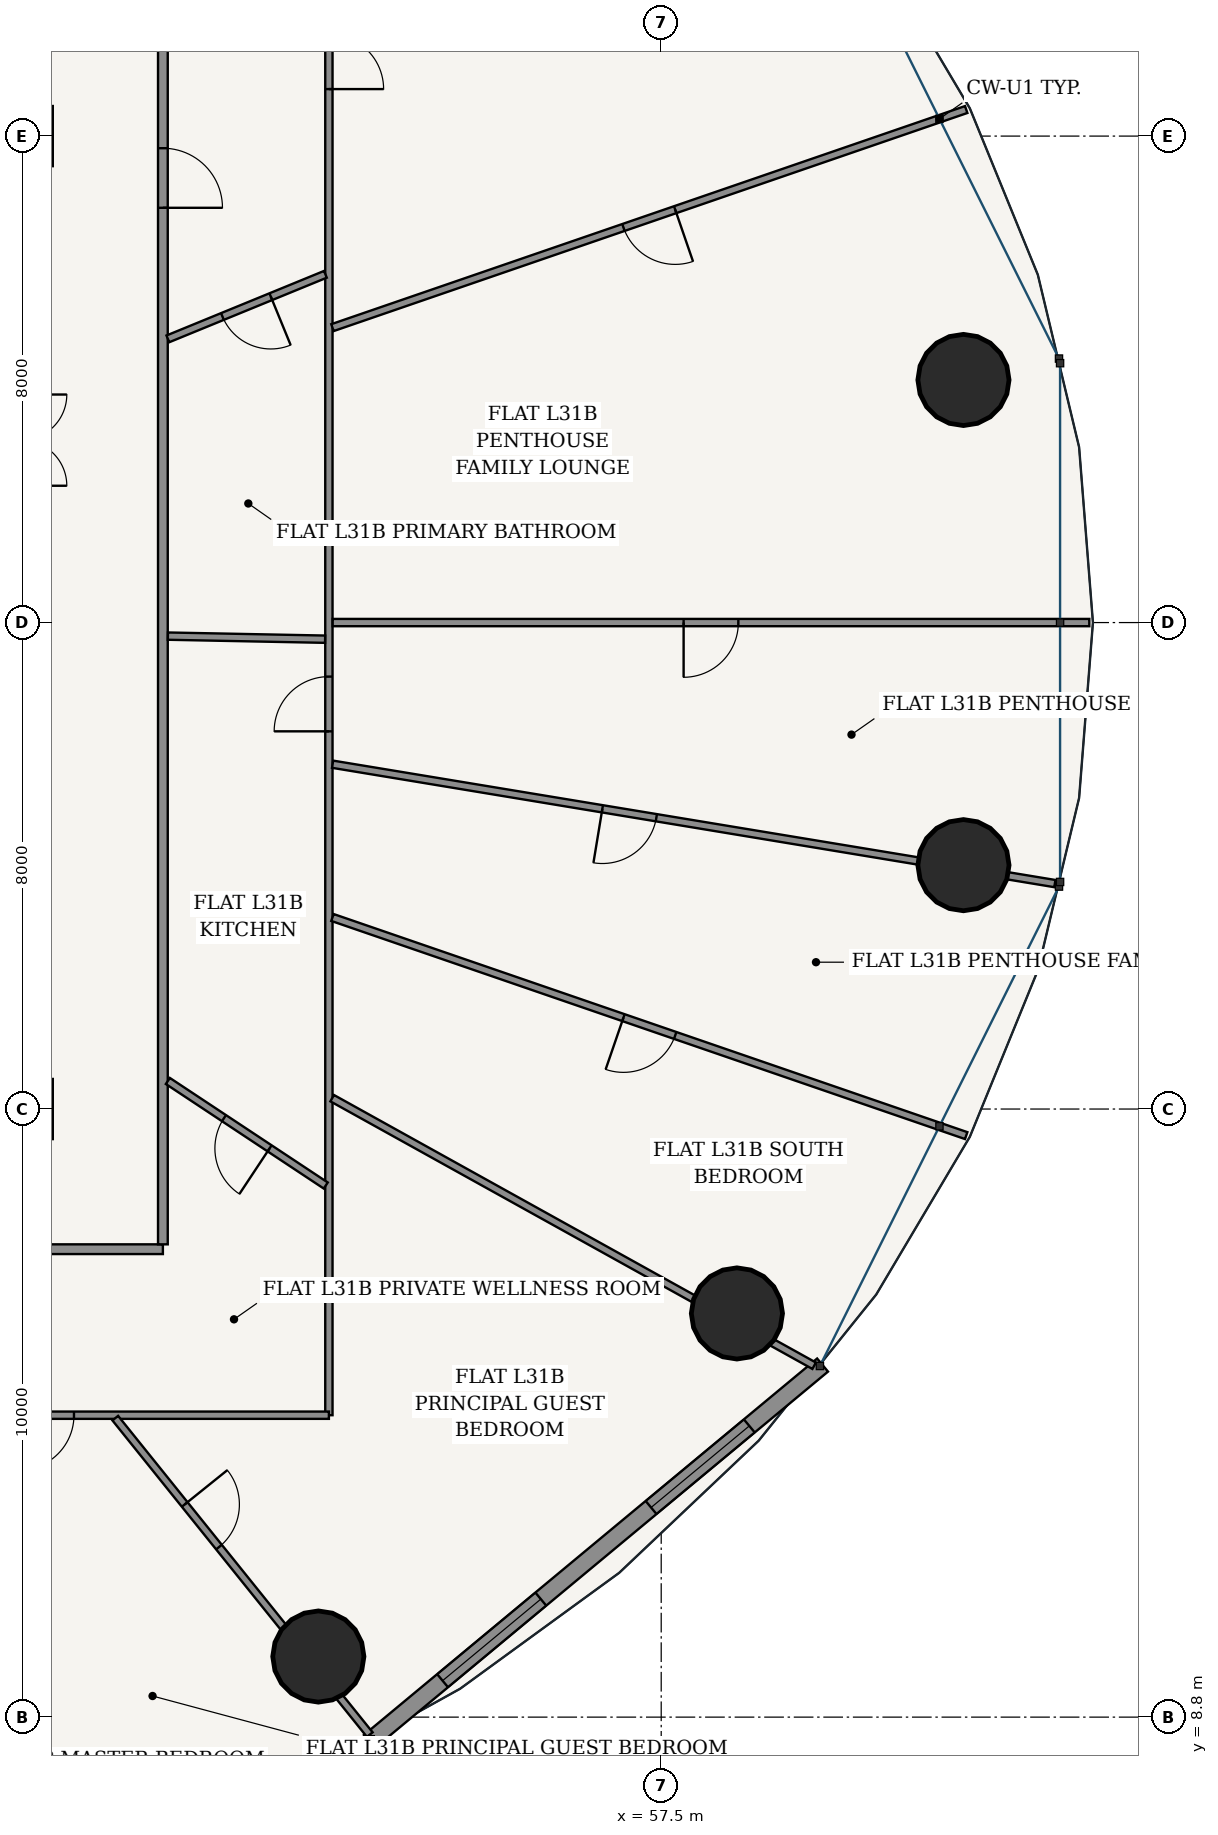
"""IFC4 building model, lengths in metres.
Left out: names, types, materials, properties, quantities, classifications, styles, units other than length and angle.
Written with IfcOpenShell. Run it as: python <this file> out.ifc"""

import sys

from ifc_helpers import new_model, si_unit, direction, frame, frame_2d, origin, origin_2d, place, context, subcontext, project, spatial, rectangle, hollow_circle, extrude, source, transform, mapped, element, fill, save


model = new_model("IFC4")
c1 = context("Model", 3, precision=1e-05, world=origin(), true_north=direction((-0.2419218956, 0.970295726276)))
c2 = subcontext(c1, "Body", "Model", "MODEL_VIEW")
j1 = project(units=[si_unit("LENGTHUNIT", "METRE"), si_unit("PLANEANGLEUNIT", "RADIAN")], contexts=[c1])
p1 = place(None, origin())
s1 = spatial("IfcSite", under=j1, at=p1, CompositionType="ELEMENT")
p2 = place(p1, origin())
s2 = spatial("IfcBuilding", under=s1, at=p2, CompositionType="ELEMENT")
p3 = place(p2, frame((0.0, 0.0, 119.4)))
s3 = spatial("IfcBuildingStorey", under=s2, at=p3, CompositionType="ELEMENT", Elevation=119.4)
for number, where, z_axis, x_axis in (
    (1, (62.471, 30.79, 0.0), (0.0, 0.0, 1.0), (1.0, 0.0, 0.0)),
    (2, (51.862, 9.796, 0.0), (0.0, 0.0, 1.0), (1.0, 0.0, 0.0)),
    (3, (58.745, 15.438, 0.0), (0.0, 0.0, 1.0), (1.0, 0.0, 0.0)),
    (4, (62.471, 22.81, 0.0), (0.0, 0.0, 1.0), (1.0, 0.0, 0.0)),
):
    element("IfcColumn", number, at=place(p3, frame(where, z_axis=z_axis, x_axis=x_axis)), inside=s3, PredefinedType="COLUMN", context=c2, shape_type="SweptSolid", body=[
        extrude(hollow_circle(Radius=0.75, WallThickness=0.045, at=origin_2d()), origin(), (0.0, 0.0, 1.0), 3.6),
    ])
p4 = place(p3, frame((52.7, 8.398, 0.0), z_axis=(0.0, 0.0, 1.0), x_axis=(0.769254958887, 0.638941944333, 0.0)))
e5 = element("IfcWall", 5, at=p4, inside=s3, PredefinedType="SOLIDWALL", context=c2, shape_type="SweptSolid", body=[
    extrude(rectangle(XDim=9.69, YDim=0.28, at=frame_2d((4.845, 0.0))), origin(), (0.0, 0.0, 1.0), 3.325),
])
p5 = place(p4, frame((1.566, 0.0, 0.85)))
e6 = element("IfcOpeningElement", 6, at=p5, cuts=e5, PredefinedType="OPENING", context=c2, shape_type="SweptSolid", body=[
    extrude(rectangle(XDim=2.1, YDim=1.95, at=frame_2d((1.05, 0.975))), frame((0.0, 0.15, 0.0), z_axis=(0.0, -1.0, 0.0), x_axis=(1.0, 0.0, 0.0)), (0.0, 0.0, 1.0), 0.3),
])
p6 = place(p4, frame((6.023, 0.0, 0.85)))
e7 = element("IfcOpeningElement", 7, at=p6, cuts=e5, PredefinedType="OPENING", context=c2, shape_type="SweptSolid", body=[
    extrude(rectangle(XDim=2.1, YDim=1.95, at=frame_2d((1.05, 0.975))), frame((0.0, 0.15, 0.0), z_axis=(0.0, -1.0, 0.0), x_axis=(1.0, 0.0, 0.0)), (0.0, 0.0, 1.0), 0.3),
])
p7 = place(p3, frame((26.695, 16.495, 0.0), z_axis=(0.0, 0.0, 1.0), x_axis=(1.0, 0.0, 0.0)))
e8 = element("IfcWall", 8, at=p7, inside=s3, PredefinedType="PARTITIONING", context=c2, shape_type="SweptSolid", body=[
    extrude(rectangle(XDim=22.61, YDim=0.16, at=frame_2d((11.305, 0.0))), origin(), (0.0, 0.0, 1.0), 2.767),
])
p8 = place(p3, frame((49.305, 16.575, 0.0), z_axis=(0.0, 0.0, 1.0), x_axis=(0.0, 1.0, 0.0)))
e9 = element("IfcWall", 9, at=p8, inside=s3, PredefinedType="PARTITIONING", context=c2, shape_type="SweptSolid", body=[
    extrude(rectangle(XDim=20.45, YDim=0.16, at=frame_2d((10.225, 0.0))), origin(), (0.0, 0.0, 1.0), 2.767),
])
p9 = place(p8, frame((17.046, 0.0, 0.0)))
e10 = element("IfcOpeningElement", 10, at=p9, cuts=e9, PredefinedType="OPENING", context=c2, shape_type="SweptSolid", body=[
    extrude(rectangle(XDim=0.98, YDim=2.2, at=frame_2d((0.49, 1.1))), frame((0.0, 0.09, 0.0), z_axis=(0.0, -1.0, 0.0), x_axis=(1.0, 0.0, 0.0)), (0.0, 0.0, 1.0), 0.18),
])
p10 = place(p3, frame((52.035, 39.835, 0.0), z_axis=(0.0, 0.0, 1.0), x_axis=(0.0, -1.0, 0.0)))
e11 = element("IfcWall", 11, at=p10, inside=s3, PredefinedType="PARTITIONING", context=c2, shape_type="SweptSolid", body=[
    extrude(rectangle(XDim=26.07, YDim=0.12, at=frame_2d((13.035, 0.0))), origin(), (0.0, 0.0, 1.0), 2.767),
])
p11 = place(p10, frame((3.362, 0.0, 0.0)))
e12 = element("IfcOpeningElement", 12, at=p11, cuts=e11, PredefinedType="OPENING", context=c2, shape_type="SweptSolid", body=[
    extrude(rectangle(XDim=0.9, YDim=2.15, at=frame_2d((0.45, 1.075))), frame((0.0, 0.07, 0.0), z_axis=(0.0, -1.0, 0.0), x_axis=(1.0, 0.0, 0.0)), (0.0, 0.0, 1.0), 0.14),
])
p12 = place(p10, frame((13.924, 0.0, 0.0)))
e13 = element("IfcOpeningElement", 13, at=p12, cuts=e11, PredefinedType="OPENING", context=c2, shape_type="SweptSolid", body=[
    extrude(rectangle(XDim=0.9, YDim=2.15, at=frame_2d((0.45, 1.075))), frame((0.0, 0.07, 0.0), z_axis=(0.0, -1.0, 0.0), x_axis=(1.0, 0.0, 0.0)), (0.0, 0.0, 1.0), 0.14),
])
p13 = place(p3, frame((52.035, 13.765, 0.0), z_axis=(0.0, 0.0, 1.0), x_axis=(-1.0, 0.0, 0.0)))
e14 = element("IfcWall", 14, at=p13, inside=s3, PredefinedType="PARTITIONING", context=c2, shape_type="SweptSolid", body=[
    extrude(rectangle(XDim=24.416, YDim=0.12, at=frame_2d((12.208, 0.0))), origin(), (0.0, 0.0, 1.0), 2.767),
])
p14 = place(p13, frame((4.192, 0.0, 0.0)))
e15 = element("IfcOpeningElement", 15, at=p14, cuts=e14, PredefinedType="OPENING", context=c2, shape_type="SweptSolid", body=[
    extrude(rectangle(XDim=0.9, YDim=2.15, at=frame_2d((0.45, 1.075))), frame((0.0, 0.07, 0.0), z_axis=(0.0, -1.0, 0.0), x_axis=(1.0, 0.0, 0.0)), (0.0, 0.0, 1.0), 0.14),
])
p15 = place(p13, frame((19.728, 0.0, 0.0)))
e16 = element("IfcOpeningElement", 16, at=p15, cuts=e14, PredefinedType="OPENING", context=c2, shape_type="SweptSolid", body=[
    extrude(rectangle(XDim=0.86, YDim=2.15, at=frame_2d((0.43, 1.075))), frame((0.0, 0.07, 0.0), z_axis=(0.0, -1.0, 0.0), x_axis=(1.0, 0.0, 0.0)), (0.0, 0.0, 1.0), 0.14),
])
p16 = place(p3, frame((44.526, 13.709, 0.0), z_axis=(0.0, 0.0, 1.0), x_axis=(0.446179583353, -0.894943450392, 0.0)))
e17 = element("IfcWall", 17, at=p16, inside=s3, PredefinedType="PARTITIONING", context=c2, shape_type="SweptSolid", body=[
    extrude(rectangle(XDim=8.125, YDim=0.12, at=frame_2d((4.062, 0.0))), origin(), (0.0, 0.0, 1.0), 2.767),
])
p17 = place(p16, frame((3.612, 0.0, 0.0)))
e18 = element("IfcOpeningElement", 18, at=p17, cuts=e17, PredefinedType="OPENING", context=c2, shape_type="SweptSolid", body=[
    extrude(rectangle(XDim=0.9, YDim=2.15, at=frame_2d((0.45, 1.075))), frame((0.0, 0.07, 0.0), z_axis=(0.0, -1.0, 0.0), x_axis=(1.0, 0.0, 0.0)), (0.0, 0.0, 1.0), 0.14),
])
p18 = place(p3, frame((48.522, 13.717, 0.0), z_axis=(0.0, 0.0, 1.0), x_axis=(0.626707979732, -0.77925419995, 0.0)))
e19 = element("IfcWall", 19, at=p18, inside=s3, PredefinedType="PARTITIONING", context=c2, shape_type="SweptSolid", body=[
    extrude(rectangle(XDim=6.679, YDim=0.12, at=frame_2d((3.339, 0.0))), origin(), (0.0, 0.0, 1.0), 2.767),
])
p19 = place(p18, frame((1.821, 0.0, 0.0)))
e20 = element("IfcOpeningElement", 20, at=p19, cuts=e19, PredefinedType="OPENING", context=c2, shape_type="SweptSolid", body=[
    extrude(rectangle(XDim=0.9, YDim=2.15, at=frame_2d((0.45, 1.075))), frame((0.0, 0.07, 0.0), z_axis=(0.0, -1.0, 0.0), x_axis=(1.0, 0.0, 0.0)), (0.0, 0.0, 1.0), 0.14),
])
p20 = place(p3, frame((52.089, 18.979, 0.0), z_axis=(0.0, 0.0, 1.0), x_axis=(0.874313476423, -0.485361664066, 0.0)))
e21 = element("IfcWall", 21, at=p20, inside=s3, PredefinedType="PARTITIONING", context=c2, shape_type="SweptSolid", body=[
    extrude(rectangle(XDim=9.066, YDim=0.12, at=frame_2d((4.533, 0.0))), origin(), (0.0, 0.0, 1.0), 2.767),
])
p21 = place(p3, frame((52.094, 21.95, 0.0), z_axis=(0.0, 0.0, 1.0), x_axis=(0.945573120726, -0.32540970078, 0.0)))
e22 = element("IfcWall", 22, at=p21, inside=s3, PredefinedType="PARTITIONING", context=c2, shape_type="SweptSolid", body=[
    extrude(rectangle(XDim=11.022, YDim=0.12, at=frame_2d((5.511, 0.0))), origin(), (0.0, 0.0, 1.0), 2.767),
])
p22 = place(p21, frame((5.061, 0.0, 0.0)))
e23 = element("IfcOpeningElement", 23, at=p22, cuts=e22, PredefinedType="OPENING", context=c2, shape_type="SweptSolid", body=[
    extrude(rectangle(XDim=0.9, YDim=2.15, at=frame_2d((0.45, 1.075))), frame((0.0, 0.07, 0.0), z_axis=(0.0, -1.0, 0.0), x_axis=(1.0, 0.0, 0.0)), (0.0, 0.0, 1.0), 0.14),
])
p23 = place(p3, frame((52.096, 24.47, 0.0), z_axis=(0.0, 0.0, 1.0), x_axis=(0.986618264768, -0.163047231274, 0.0)))
e24 = element("IfcWall", 24, at=p23, inside=s3, PredefinedType="PARTITIONING", context=c2, shape_type="SweptSolid", body=[
    extrude(rectangle(XDim=12.039, YDim=0.12, at=frame_2d((6.02, 0.0))), origin(), (0.0, 0.0, 1.0), 2.767),
])
p24 = place(p23, frame((4.496, 0.0, 0.0)))
e25 = element("IfcOpeningElement", 25, at=p24, cuts=e24, PredefinedType="OPENING", context=c2, shape_type="SweptSolid", body=[
    extrude(rectangle(XDim=0.9, YDim=2.15, at=frame_2d((0.45, 1.075))), frame((0.0, 0.07, 0.0), z_axis=(0.0, -1.0, 0.0), x_axis=(1.0, 0.0, 0.0)), (0.0, 0.0, 1.0), 0.14),
])
p25 = place(p3, frame((52.097, 26.8, 0.0), z_axis=(0.0, 0.0, 1.0), x_axis=(1.0, 0.0, 0.0)))
e26 = element("IfcWall", 26, at=p25, inside=s3, PredefinedType="PARTITIONING", context=c2, shape_type="SweptSolid", body=[
    extrude(rectangle(XDim=12.443, YDim=0.12, at=frame_2d((6.222, 0.0))), origin(), (0.0, 0.0, 1.0), 2.767),
])
p26 = place(p25, frame((5.771, 0.0, 0.0)))
e27 = element("IfcOpeningElement", 27, at=p26, cuts=e26, PredefinedType="OPENING", context=c2, shape_type="SweptSolid", body=[
    extrude(rectangle(XDim=0.9, YDim=2.15, at=frame_2d((0.45, 1.075))), frame((0.0, 0.07, 0.0), z_axis=(0.0, -1.0, 0.0), x_axis=(1.0, 0.0, 0.0)), (0.0, 0.0, 1.0), 0.14),
])
p27 = place(p3, frame((52.094, 31.65, 0.0), z_axis=(0.0, 0.0, 1.0), x_axis=(0.945573120726, 0.32540970078, 0.0)))
e28 = element("IfcWall", 28, at=p27, inside=s3, PredefinedType="PARTITIONING", context=c2, shape_type="SweptSolid", body=[
    extrude(rectangle(XDim=11.022, YDim=0.12, at=frame_2d((5.511, 0.0))), origin(), (0.0, 0.0, 1.0), 2.767),
])
p28 = place(p27, frame((5.061, 0.0, 0.0)))
e29 = element("IfcOpeningElement", 29, at=p28, cuts=e28, PredefinedType="OPENING", context=c2, shape_type="SweptSolid", body=[
    extrude(rectangle(XDim=0.9, YDim=2.15, at=frame_2d((0.45, 1.075))), frame((0.0, 0.07, 0.0), z_axis=(0.0, -1.0, 0.0), x_axis=(1.0, 0.0, 0.0)), (0.0, 0.0, 1.0), 0.14),
])
p29 = place(p3, frame((49.387, 19.261, 0.0), z_axis=(0.0, 0.0, 1.0), x_axis=(0.833806969544, -0.552056099993, 0.0)))
e30 = element("IfcWall", 30, at=p29, inside=s3, PredefinedType="PARTITIONING", context=c2, shape_type="SweptSolid", body=[
    extrude(rectangle(XDim=3.114, YDim=0.12, at=frame_2d((1.557, 0.0))), origin(), (0.0, 0.0, 1.0), 3.325),
])
p30 = place(p29, frame((1.107, 0.0, 0.0)))
e31 = element("IfcOpeningElement", 31, at=p30, cuts=e30, PredefinedType="OPENING", context=c2, shape_type="SweptSolid", body=[
    extrude(rectangle(XDim=0.9, YDim=2.15, at=frame_2d((0.45, 1.075))), frame((0.0, 0.07, 0.0), z_axis=(0.0, -1.0, 0.0), x_axis=(1.0, 0.0, 0.0)), (0.0, 0.0, 1.0), 0.14),
])
p31 = place(p3, frame((49.387, 26.577, 0.0), z_axis=(0.0, 0.0, 1.0), x_axis=(0.999807240787, -0.019633676934, 0.0)))
e32 = element("IfcWall", 32, at=p31, inside=s3, PredefinedType="PARTITIONING", context=c2, shape_type="SweptSolid", body=[
    extrude(rectangle(XDim=2.586, YDim=0.12, at=frame_2d((1.293, 0.0))), origin(), (0.0, 0.0, 1.0), 3.325),
])
p32 = place(p3, frame((49.387, 31.465, 0.0), z_axis=(0.0, 0.0, 1.0), x_axis=(0.925328713836, 0.37916588896, 0.0)))
e33 = element("IfcWall", 33, at=p32, inside=s3, PredefinedType="PARTITIONING", context=c2, shape_type="SweptSolid", body=[
    extrude(rectangle(XDim=2.8, YDim=0.12, at=frame_2d((1.4, 0.0))), origin(), (0.0, 0.0, 1.0), 3.325),
])
p33 = place(p32, frame((0.97, 0.0, 0.0)))
e34 = element("IfcOpeningElement", 34, at=p33, cuts=e33, PredefinedType="OPENING", context=c2, shape_type="SweptSolid", body=[
    extrude(rectangle(XDim=0.86, YDim=2.15, at=frame_2d((0.43, 1.075))), frame((0.0, 0.07, 0.0), z_axis=(0.0, -1.0, 0.0), x_axis=(1.0, 0.0, 0.0)), (0.0, 0.0, 1.0), 0.14),
])
m1 = source(origin(), c2, "Body", "SweptSolid", [
    extrude(rectangle(XDim=2.1, YDim=1.95, at=frame_2d((1.05, 0.975))), frame((0.0, 0.03, 0.0), z_axis=(0.0, -1.0, 0.0), x_axis=(1.0, 0.0, 0.0)), (0.0, 0.0, 1.0), 0.06),
])
p34 = place(p5, origin())
e35 = element("IfcWindow", 35, at=p34, inside=s3, PartitioningType="SINGLE_PANEL", PredefinedType="WINDOW", context=c2, shape_type="MappedRepresentation", body=[
    mapped(m1, transform((0.0, 0.0, 0.0), scale=1.0)),
])
fill(e6, e35)
p35 = place(p6, origin())
e36 = element("IfcWindow", 36, at=p35, inside=s3, PartitioningType="SINGLE_PANEL", PredefinedType="WINDOW", context=c2, shape_type="MappedRepresentation", body=[
    mapped(m1, transform((0.0, 0.0, 0.0), scale=1.0)),
])
fill(e7, e36)
m2 = source(origin(), c2, "Body", "SweptSolid", [
    extrude(rectangle(XDim=0.98, YDim=2.2, at=frame_2d((0.49, 1.1))), frame((0.0, 0.025, 0.0), z_axis=(0.0, -1.0, 0.0), x_axis=(1.0, 0.0, 0.0)), (0.0, 0.0, 1.0), 0.05),
])
p36 = place(p9, frame((0.98, 0.0, 0.0), z_axis=(0.0, 0.0, 1.0), x_axis=(-1.0, 0.0, 0.0)))
e37 = element("IfcDoor", 37, at=p36, inside=s3, OperationType="SINGLE_SWING_RIGHT", PredefinedType="DOOR", context=c2, shape_type="MappedRepresentation", body=[
    mapped(m2, transform((0.0, 0.0, 0.0), scale=1.0)),
])
fill(e10, e37)
m3 = source(origin(), c2, "Body", "SweptSolid", [
    extrude(rectangle(XDim=0.86, YDim=2.15, at=frame_2d((0.43, 1.075))), frame((0.0, 0.025, 0.0), z_axis=(0.0, -1.0, 0.0), x_axis=(1.0, 0.0, 0.0)), (0.0, 0.0, 1.0), 0.05),
])
p37 = place(p33, frame((0.86, 0.0, 0.0), z_axis=(0.0, 0.0, 1.0), x_axis=(-1.0, 0.0, 0.0)))
e38 = element("IfcDoor", 38, at=p37, inside=s3, OperationType="SINGLE_SWING_LEFT", PredefinedType="DOOR", context=c2, shape_type="MappedRepresentation", body=[
    mapped(m3, transform((0.0, 0.0, 0.0), scale=1.0)),
])
fill(e34, e38)
m4 = source(origin(), c2, "Body", "SweptSolid", [
    extrude(rectangle(XDim=0.9, YDim=2.15, at=frame_2d((0.45, 1.075))), frame((0.0, 0.025, 0.0), z_axis=(0.0, -1.0, 0.0), x_axis=(1.0, 0.0, 0.0)), (0.0, 0.0, 1.0), 0.05),
])
p38 = place(p11, origin())
e39 = element("IfcDoor", 39, at=p38, inside=s3, OperationType="SINGLE_SWING_RIGHT", PredefinedType="DOOR", context=c2, shape_type="MappedRepresentation", body=[
    mapped(m4, transform((0.0, 0.0, 0.0), scale=1.0)),
])
fill(e12, e39)
p39 = place(p28, frame((0.9, 0.0, 0.0), z_axis=(0.0, 0.0, 1.0), x_axis=(-1.0, 0.0, 0.0)))
e40 = element("IfcDoor", 40, at=p39, inside=s3, OperationType="SINGLE_SWING_LEFT", PredefinedType="DOOR", context=c2, shape_type="MappedRepresentation", body=[
    mapped(m4, transform((0.0, 0.0, 0.0), scale=1.0)),
])
fill(e29, e40)
p40 = place(p26, frame((0.9, 0.0, 0.0), z_axis=(0.0, 0.0, 1.0), x_axis=(-1.0, 0.0, 0.0)))
e41 = element("IfcDoor", 41, at=p40, inside=s3, OperationType="SINGLE_SWING_RIGHT", PredefinedType="DOOR", context=c2, shape_type="MappedRepresentation", body=[
    mapped(m4, transform((0.0, 0.0, 0.0), scale=1.0)),
])
fill(e27, e41)
p41 = place(p12, frame((0.9, 0.0, 0.0), z_axis=(0.0, 0.0, 1.0), x_axis=(-1.0, 0.0, 0.0)))
e42 = element("IfcDoor", 42, at=p41, inside=s3, OperationType="SINGLE_SWING_LEFT", PredefinedType="DOOR", context=c2, shape_type="MappedRepresentation", body=[
    mapped(m4, transform((0.0, 0.0, 0.0), scale=1.0)),
])
fill(e13, e42)
p42 = place(p24, frame((0.9, 0.0, 0.0), z_axis=(0.0, 0.0, 1.0), x_axis=(-1.0, 0.0, 0.0)))
e43 = element("IfcDoor", 43, at=p42, inside=s3, OperationType="SINGLE_SWING_RIGHT", PredefinedType="DOOR", context=c2, shape_type="MappedRepresentation", body=[
    mapped(m4, transform((0.0, 0.0, 0.0), scale=1.0)),
])
fill(e25, e43)
p43 = place(p30, frame((0.9, 0.0, 0.0), z_axis=(0.0, 0.0, 1.0), x_axis=(-1.0, 0.0, 0.0)))
e44 = element("IfcDoor", 44, at=p43, inside=s3, OperationType="SINGLE_SWING_LEFT", PredefinedType="DOOR", context=c2, shape_type="MappedRepresentation", body=[
    mapped(m4, transform((0.0, 0.0, 0.0), scale=1.0)),
])
fill(e31, e44)
p44 = place(p14, origin())
e45 = element("IfcDoor", 45, at=p44, inside=s3, OperationType="SINGLE_SWING_RIGHT", PredefinedType="DOOR", context=c2, shape_type="MappedRepresentation", body=[
    mapped(m4, transform((0.0, 0.0, 0.0), scale=1.0)),
])
fill(e15, e45)
p45 = place(p19, origin())
e46 = element("IfcDoor", 46, at=p45, inside=s3, OperationType="SINGLE_SWING_LEFT", PredefinedType="DOOR", context=c2, shape_type="MappedRepresentation", body=[
    mapped(m4, transform((0.0, 0.0, 0.0), scale=1.0)),
])
fill(e20, e46)
p46 = place(p22, frame((0.9, 0.0, 0.0), z_axis=(0.0, 0.0, 1.0), x_axis=(-1.0, 0.0, 0.0)))
e47 = element("IfcDoor", 47, at=p46, inside=s3, OperationType="SINGLE_SWING_RIGHT", PredefinedType="DOOR", context=c2, shape_type="MappedRepresentation", body=[
    mapped(m4, transform((0.0, 0.0, 0.0), scale=1.0)),
])
fill(e23, e47)
save(model, sys.argv[1])
